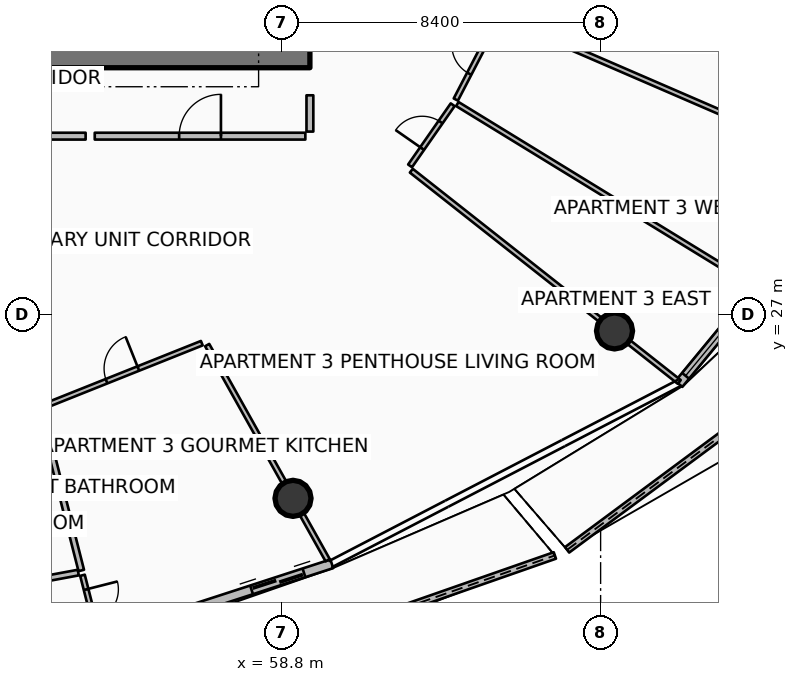
"""IFC4 building model, lengths in metres.
Left out: names, types, materials, properties, quantities, classifications, styles, units other than length and angle.
Written with IfcOpenShell. Run it as: python <this file> out.ifc"""

import sys

from ifc_helpers import new_model, si_unit, direction, frame, frame_2d, origin, origin_2d, place, context, subcontext, project, spatial, polyline, rectangle, circle, outline, extrude, element, fill, save


model = new_model("IFC4")
c1 = context("Model", 3, precision=1e-05, world=origin(), true_north=direction((0.0, 1.0)))
c2 = subcontext(c1, "Body", "Model", "MODEL_VIEW")
j1 = project(units=[si_unit("LENGTHUNIT", "METRE"), si_unit("PLANEANGLEUNIT", "RADIAN")], contexts=[c1])
p1 = place(None, origin())
s1 = spatial("IfcSite", under=j1, at=p1, CompositionType="ELEMENT")
p2 = place(p1, origin())
s2 = spatial("IfcBuilding", under=s1, at=p2, CompositionType="ELEMENT")
p3 = place(p2, frame((0.0, 0.0, 279.05)))
s3 = spatial("IfcBuildingStorey", under=s2, at=p3, CompositionType="ELEMENT", Elevation=279.05)
p4 = place(p3, frame((49.95, 33.75, 0.0), z_axis=(0.0, 0.0, 1.0), x_axis=(1.0, 0.0, 0.0)))
e1 = element("IfcWall", 1, at=p4, inside=s3, PredefinedType="SHEAR", context=c2, shape_type="SweptSolid", body=[
    extrude(rectangle(XDim=9.6, YDim=0.5, at=frame_2d((4.8, 0.0))), origin(), (0.0, 0.0, 1.0), 3.85),
])
for number, where, z_axis, x_axis in (
    (2, (59.105, 22.17, 0.0), (0.0, 0.0, 1.0), (1.0, 0.0, 0.0)),
    (3, (67.566, 26.575, 0.0), (0.0, 0.0, 1.0), (1.0, 0.0, 0.0)),
):
    element("IfcColumn", number, at=place(p3, frame(where, z_axis=z_axis, x_axis=x_axis)), inside=s3, PredefinedType="COLUMN", context=c2, shape_type="SweptSolid", body=[
        extrude(circle(Radius=0.475, at=origin_2d()), origin(), (0.0, 0.0, 1.0), 3.59),
    ])
p5 = place(p3, frame((56.173, 17.234, 0.0), z_axis=(0.0, 0.0, 1.0), x_axis=(0.944003849273, 0.329934436757, 0.0)))
e4 = element("IfcWall", 4, at=p5, inside=s3, PredefinedType="PARAPET", context=c2, shape_type="SweptSolid", body=[
    extrude(outline(polyline([(0.0, 0.0), (10.406, 0.0), (10.406, 1.483), (5.203, 1.284), (0.0, 1.148), (0.0, 0.0)])), frame((0.0, 0.09, 0.0), z_axis=(0.0, -1.0, 0.0), x_axis=(1.0, 0.0, 0.0)), (0.0, 0.0, 1.0), 0.18),
])
p6 = place(p3, frame((66.319, 20.815, 0.0), z_axis=(0.0, 0.0, 1.0), x_axis=(0.803330402034, 0.59553359701, 0.0)))
e5 = element("IfcWall", 5, at=p6, inside=s3, PredefinedType="PARAPET", context=c2, shape_type="SweptSolid", body=[
    extrude(outline(polyline([(0.0, 0.0), (11.674, 0.0), (11.674, 1.832), (5.837, 1.696), (0.0, 1.497), (0.0, 0.0)])), frame((0.0, 0.09, 0.0), z_axis=(0.0, -1.0, 0.0), x_axis=(1.0, 0.0, 0.0)), (0.0, 0.0, 1.0), 0.18),
])
p7 = place(p3, frame((50.858, 17.436, 0.0), z_axis=(0.0, 0.0, 1.0), x_axis=(0.951055974609, 0.309018661507, 0.0)))
e6 = element("IfcWall", 6, at=p7, inside=s3, PredefinedType="SOLIDWALL", context=c2, shape_type="SweptSolid", body=[
    extrude(rectangle(XDim=9.745, YDim=0.24, at=frame_2d((4.873, 0.0))), origin(), (0.0, 0.0, 1.0), 2.54),
])
p8 = place(p7, frame((7.525, 0.0, 0.0)))
e7 = element("IfcOpeningElement", 7, at=p8, cuts=e6, PredefinedType="OPENING", context=c2, shape_type="SweptSolid", body=[
    extrude(rectangle(XDim=1.45, YDim=2.15, at=frame_2d((0.725, 1.075))), frame((0.0, 0.13, 0.0), z_axis=(0.0, -1.0, 0.0), x_axis=(1.0, 0.0, 0.0)), (0.0, 0.0, 1.0), 0.26),
])
p9 = place(p7, frame((0.28, 0.0, 0.65)))
e8 = element("IfcOpeningElement", 8, at=p9, cuts=e6, PredefinedType="OPENING", context=c2, shape_type="SweptSolid", body=[
    extrude(rectangle(XDim=1.6, YDim=1.5, at=frame_2d((0.8, 0.75))), frame((0.0, 0.13, 0.0), z_axis=(0.0, -1.0, 0.0), x_axis=(1.0, 0.0, 0.0)), (0.0, 0.0, 1.0), 0.26),
])
p10 = place(p3, frame((69.258, 25.178, 0.0), z_axis=(0.0, 0.0, 1.0), x_axis=(0.636680093065, 0.771128043255, 0.0)))
e9 = element("IfcWall", 9, at=p10, inside=s3, PredefinedType="SOLIDWALL", context=c2, shape_type="SweptSolid", body=[
    extrude(rectangle(XDim=11.438, YDim=0.24, at=frame_2d((5.719, 0.0))), origin(), (0.0, 0.0, 1.0), 2.54),
])
p11 = place(p10, frame((9.218, 0.0, 0.0)))
e10 = element("IfcOpeningElement", 10, at=p11, cuts=e9, PredefinedType="OPENING", context=c2, shape_type="SweptSolid", body=[
    extrude(rectangle(XDim=1.45, YDim=2.15, at=frame_2d((0.725, 1.075))), frame((0.0, 0.13, 0.0), z_axis=(0.0, -1.0, 0.0), x_axis=(1.0, 0.0, 0.0)), (0.0, 0.0, 1.0), 0.26),
])
p12 = place(p10, frame((0.28, 0.0, 0.65)))
e11 = element("IfcOpeningElement", 11, at=p12, cuts=e9, PredefinedType="OPENING", context=c2, shape_type="SweptSolid", body=[
    extrude(rectangle(XDim=1.6, YDim=1.5, at=frame_2d((0.8, 0.75))), frame((0.0, 0.13, 0.0), z_axis=(0.0, -1.0, 0.0), x_axis=(1.0, 0.0, 0.0)), (0.0, 0.0, 1.0), 0.26),
])
p13 = place(p3, frame((53.888, 31.7, 0.0), z_axis=(0.0, 0.0, 1.0), x_axis=(1.0, 0.0, 0.0)))
e12 = element("IfcWall", 12, at=p13, inside=s3, PredefinedType="PARTITIONING", context=c2, shape_type="SweptSolid", body=[
    extrude(rectangle(XDim=5.542, YDim=0.18, at=frame_2d((2.771, 0.0))), origin(), (0.0, 0.0, 1.0), 2.957),
])
p14 = place(p13, frame((2.221, 0.0, 0.0)))
e13 = element("IfcOpeningElement", 13, at=p14, cuts=e12, PredefinedType="OPENING", context=c2, shape_type="SweptSolid", body=[
    extrude(rectangle(XDim=1.1, YDim=2.1, at=frame_2d((0.55, 1.05))), frame((0.0, 0.1, 0.0), z_axis=(0.0, -1.0, 0.0), x_axis=(1.0, 0.0, 0.0)), (0.0, 0.0, 1.0), 0.2),
])
p15 = place(p3, frame((59.55, 31.82, 0.0), z_axis=(0.0, 0.0, 1.0), x_axis=(0.0, 1.0, 0.0)))
e14 = element("IfcWall", 14, at=p15, inside=s3, PredefinedType="PARTITIONING", context=c2, shape_type="SweptSolid", body=[
    extrude(rectangle(XDim=0.955, YDim=0.18, at=frame_2d((0.477, 0.0))), origin(), (0.0, 0.0, 1.0), 2.957),
])
p16 = place(p3, frame((49.339, 31.7, 0.0), z_axis=(0.0, 0.0, 1.0), x_axis=(1.0, 0.0, 0.0)))
e15 = element("IfcWall", 15, at=p16, inside=s3, PredefinedType="PARTITIONING", context=c2, shape_type="SweptSolid", body=[
    extrude(rectangle(XDim=4.309, YDim=0.18, at=frame_2d((2.155, 0.0))), origin(), (0.0, 0.0, 1.0), 2.957),
])
p17 = place(p3, frame((56.847, 26.203, 0.0), z_axis=(0.0, 0.0, 1.0), x_axis=(0.488636594114, -0.872487409017, 0.0)))
e16 = element("IfcWall", 16, at=p17, inside=s3, PredefinedType="PARTITIONING", context=c2, shape_type="SweptSolid", body=[
    extrude(rectangle(XDim=6.489, YDim=0.125, at=frame_2d((3.244, 0.0))), origin(), (0.0, 0.0, 1.0), 2.957),
])
p18 = place(p3, frame((50.738, 19.712, 0.0), z_axis=(0.0, 0.0, 1.0), x_axis=(0.983195760322, 0.18255436693, 0.0)))
e17 = element("IfcWall", 17, at=p18, inside=s3, PredefinedType="PARTITIONING", context=c2, shape_type="SweptSolid", body=[
    extrude(rectangle(XDim=2.763, YDim=0.15, at=frame_2d((1.381, 0.0))), origin(), (0.0, 0.0, 1.0), 2.957),
])
p19 = place(p3, frame((52.466, 24.464, 0.0), z_axis=(0.0, 0.0, 1.0), x_axis=(0.246795883472, -0.969067485731, 0.0)))
e18 = element("IfcWall", 18, at=p19, inside=s3, PredefinedType="PARTITIONING", context=c2, shape_type="SweptSolid", body=[
    extrude(rectangle(XDim=4.326, YDim=0.15, at=frame_2d((2.163, 0.0))), origin(), (0.0, 0.0, 1.0), 3.03),
])
p20 = place(p3, frame((53.565, 20.146, 0.0), z_axis=(0.0, 0.0, 1.0), x_axis=(0.24689818157, -0.969041427359, 0.0)))
e19 = element("IfcWall", 19, at=p20, inside=s3, PredefinedType="PARTITIONING", context=c2, shape_type="SweptSolid", body=[
    extrude(rectangle(XDim=1.619, YDim=0.125, at=frame_2d((0.809, 0.0))), origin(), (0.0, 0.0, 1.0), 3.03),
])
p21 = place(p20, frame((0.385, 0.0, 0.0)))
e20 = element("IfcOpeningElement", 20, at=p21, cuts=e19, PredefinedType="OPENING", context=c2, shape_type="SweptSolid", body=[
    extrude(rectangle(XDim=0.85, YDim=2.06, at=frame_2d((0.425, 1.03))), frame((0.0, 0.073, 0.0), z_axis=(0.0, -1.0, 0.0), x_axis=(1.0, 0.0, 0.0)), (0.0, 0.0, 1.0), 0.145),
])
p22 = place(p3, frame((52.527, 24.584, 0.0), z_axis=(0.0, 0.0, 1.0), x_axis=(0.928678664633, 0.370885343274, 0.0)))
e21 = element("IfcWall", 21, at=p22, inside=s3, PredefinedType="PARTITIONING", context=c2, shape_type="SweptSolid", body=[
    extrude(rectangle(XDim=4.499, YDim=0.125, at=frame_2d((2.249, 0.0))), origin(), (0.0, 0.0, 1.0), 2.957),
])
p23 = place(p22, frame((1.799, 0.0, 0.0)))
e22 = element("IfcOpeningElement", 22, at=p23, cuts=e21, PredefinedType="OPENING", context=c2, shape_type="SweptSolid", body=[
    extrude(rectangle(XDim=0.9, YDim=2.08, at=frame_2d((0.45, 1.04))), frame((0.0, 0.073, 0.0), z_axis=(0.0, -1.0, 0.0), x_axis=(1.0, 0.0, 0.0)), (0.0, 0.0, 1.0), 0.145),
])
p24 = place(p3, frame((62.219, 30.791, 0.0), z_axis=(0.0, 0.0, 1.0), x_axis=(0.785316198055, -0.619094878893, 0.0)))
e23 = element("IfcWall", 23, at=p24, inside=s3, PredefinedType="PARTITIONING", context=c2, shape_type="SweptSolid", body=[
    extrude(rectangle(XDim=8.979, YDim=0.125, at=frame_2d((4.489, 0.0))), origin(), (0.0, 0.0, 1.0), 2.957),
])
p25 = place(p3, frame((63.429, 32.545, 0.0), z_axis=(0.0, 0.0, 1.0), x_axis=(0.852634226121, -0.522508254907, 0.0)))
e24 = element("IfcWall", 24, at=p25, inside=s3, PredefinedType="PARTITIONING", context=c2, shape_type="SweptSolid", body=[
    extrude(rectangle(XDim=9.151, YDim=0.125, at=frame_2d((4.576, 0.0))), origin(), (0.0, 0.0, 1.0), 3.03),
])
p26 = place(p3, frame((64.608, 34.813, 0.0), z_axis=(0.0, 0.0, 1.0), x_axis=(0.917754543675, -0.397148080146, 0.0)))
e25 = element("IfcWall", 25, at=p26, inside=s3, PredefinedType="PARTITIONING", context=c2, shape_type="SweptSolid", body=[
    extrude(rectangle(XDim=9.994, YDim=0.125, at=frame_2d((4.997, 0.0))), origin(), (0.0, 0.0, 1.0), 3.03),
])
p27 = place(p3, frame((62.186, 30.918, 0.0), z_axis=(0.0, 0.0, 1.0), x_axis=(0.571797742108, 0.820394625848, 0.0)))
e26 = element("IfcWall", 26, at=p27, inside=s3, PredefinedType="PARTITIONING", context=c2, shape_type="SweptSolid", body=[
    extrude(rectangle(XDim=1.96, YDim=0.125, at=frame_2d((0.98, 0.0))), origin(), (0.0, 0.0, 1.0), 2.957),
])
p28 = place(p27, frame((0.555, 0.0, 0.0)))
e27 = element("IfcOpeningElement", 27, at=p28, cuts=e26, PredefinedType="OPENING", context=c2, shape_type="SweptSolid", body=[
    extrude(rectangle(XDim=0.85, YDim=2.06, at=frame_2d((0.425, 1.03))), frame((0.0, 0.073, 0.0), z_axis=(0.0, -1.0, 0.0), x_axis=(1.0, 0.0, 0.0)), (0.0, 0.0, 1.0), 0.145),
])
p29 = place(p3, frame((63.389, 32.663, 0.0), z_axis=(0.0, 0.0, 1.0), x_axis=(0.461007635573, 0.887396168542, 0.0)))
e28 = element("IfcWall", 28, at=p29, inside=s3, PredefinedType="PARTITIONING", context=c2, shape_type="SweptSolid", body=[
    extrude(rectangle(XDim=2.384, YDim=0.125, at=frame_2d((1.192, 0.0))), origin(), (0.0, 0.0, 1.0), 3.03),
])
p30 = place(p29, frame((0.767, 0.0, 0.0)))
e29 = element("IfcOpeningElement", 29, at=p30, cuts=e28, PredefinedType="OPENING", context=c2, shape_type="SweptSolid", body=[
    extrude(rectangle(XDim=0.85, YDim=2.06, at=frame_2d((0.425, 1.03))), frame((0.0, 0.073, 0.0), z_axis=(0.0, -1.0, 0.0), x_axis=(1.0, 0.0, 0.0)), (0.0, 0.0, 1.0), 0.145),
])
p31 = place(p8, origin())
e30 = element("IfcDoor", 30, at=p31, inside=s3, OperationType="DOUBLE_DOOR_SLIDING", PredefinedType="DOOR", context=c2, shape_type="SweptSolid", body=[
    extrude(rectangle(XDim=1.45, YDim=2.15, at=frame_2d((0.725, 1.075))), frame((0.0, 0.025, 0.0), z_axis=(0.0, -1.0, 0.0), x_axis=(1.0, 0.0, 0.0)), (0.0, 0.0, 1.0), 0.05),
])
fill(e7, e30)
p32 = place(p12, origin())
e31 = element("IfcWindow", 31, at=p32, inside=s3, PartitioningType="SINGLE_PANEL", PredefinedType="WINDOW", context=c2, shape_type="SweptSolid", body=[
    extrude(rectangle(XDim=1.6, YDim=1.5, at=frame_2d((0.8, 0.75))), frame((0.0, 0.03, 0.0), z_axis=(0.0, -1.0, 0.0), x_axis=(1.0, 0.0, 0.0)), (0.0, 0.0, 1.0), 0.06),
])
fill(e11, e31)
p33 = place(p14, origin())
e32 = element("IfcDoor", 32, at=p33, inside=s3, OperationType="SINGLE_SWING_RIGHT", PredefinedType="DOOR", context=c2, shape_type="SweptSolid", body=[
    extrude(rectangle(XDim=1.1, YDim=2.1, at=frame_2d((0.55, 1.05))), frame((0.0, 0.025, 0.0), z_axis=(0.0, -1.0, 0.0), x_axis=(1.0, 0.0, 0.0)), (0.0, 0.0, 1.0), 0.05),
])
fill(e13, e32)
p34 = place(p21, origin())
e33 = element("IfcDoor", 33, at=p34, inside=s3, OperationType="SINGLE_SWING_LEFT", PredefinedType="DOOR", context=c2, shape_type="SweptSolid", body=[
    extrude(rectangle(XDim=0.85, YDim=2.06, at=frame_2d((0.425, 1.03))), frame((0.0, 0.025, 0.0), z_axis=(0.0, -1.0, 0.0), x_axis=(1.0, 0.0, 0.0)), (0.0, 0.0, 1.0), 0.05),
])
fill(e20, e33)
p35 = place(p23, origin())
e34 = element("IfcDoor", 34, at=p35, inside=s3, OperationType="SINGLE_SWING_RIGHT", PredefinedType="DOOR", context=c2, shape_type="SweptSolid", body=[
    extrude(rectangle(XDim=0.9, YDim=2.08, at=frame_2d((0.45, 1.04))), frame((0.0, 0.025, 0.0), z_axis=(0.0, -1.0, 0.0), x_axis=(1.0, 0.0, 0.0)), (0.0, 0.0, 1.0), 0.05),
])
fill(e22, e34)
p36 = place(p28, origin())
e35 = element("IfcDoor", 35, at=p36, inside=s3, OperationType="SINGLE_SWING_LEFT", PredefinedType="DOOR", context=c2, shape_type="SweptSolid", body=[
    extrude(rectangle(XDim=0.85, YDim=2.06, at=frame_2d((0.425, 1.03))), frame((0.0, 0.025, 0.0), z_axis=(0.0, -1.0, 0.0), x_axis=(1.0, 0.0, 0.0)), (0.0, 0.0, 1.0), 0.05),
])
fill(e27, e35)
p37 = place(p30, origin())
e36 = element("IfcDoor", 36, at=p37, inside=s3, OperationType="SINGLE_SWING_RIGHT", PredefinedType="DOOR", context=c2, shape_type="SweptSolid", body=[
    extrude(rectangle(XDim=0.85, YDim=2.06, at=frame_2d((0.425, 1.03))), frame((0.0, 0.025, 0.0), z_axis=(0.0, -1.0, 0.0), x_axis=(1.0, 0.0, 0.0)), (0.0, 0.0, 1.0), 0.05),
])
fill(e29, e36)
save(model, sys.argv[1])
